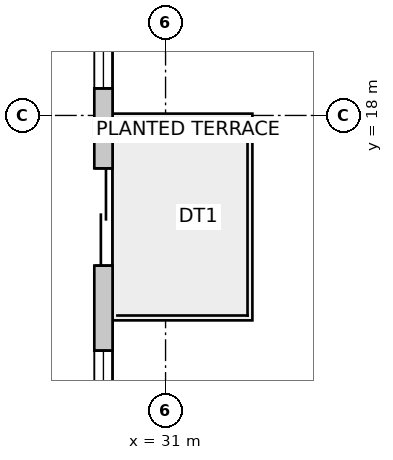
"""IFC4 building model, lengths in metres.
Left out: names, types, materials, properties, quantities, classifications, styles, units other than length and angle.
Written with IfcOpenShell. Run it as: python <this file> out.ifc"""

import sys

from ifc_helpers import new_model, si_unit, direction, frame, frame_2d, origin, place, context, subcontext, project, spatial, rectangle, extrude, source, transform, mapped, element, fill, save


model = new_model("IFC4")
c1 = context("Model", 3, precision=1e-05, world=origin(), true_north=direction((0.0, 1.0)))
c2 = subcontext(c1, "Body", "Model", "MODEL_VIEW")
j1 = project(units=[si_unit("LENGTHUNIT", "METRE"), si_unit("PLANEANGLEUNIT", "RADIAN")], contexts=[c1])
p1 = place(None, origin())
s1 = spatial("IfcSite", under=j1, at=p1, CompositionType="ELEMENT")
p2 = place(p1, origin())
s2 = spatial("IfcBuilding", under=s1, at=p2, CompositionType="ELEMENT")
p3 = place(p2, frame((0.0, 0.0, 51.0)))
s3 = spatial("IfcBuildingStorey", under=s2, at=p3, CompositionType="ELEMENT", Elevation=51.0)
p4 = place(p3, frame((29.978, 5.657, 0.0), z_axis=(0.0, 0.0, 1.0), x_axis=(0.0, 1.0, 0.0)))
e1 = element("IfcWall", 1, at=p4, inside=s3, PredefinedType="SOLIDWALL", context=c2, shape_type="SweptSolid", body=[
    extrude(rectangle(XDim=21.815, YDim=0.3, at=frame_2d((10.907, 0.0))), origin(), (0.0, 0.0, 1.0), 3.75),
])
m1 = source(origin(), c2, "Body", "SweptSolid", [
    extrude(rectangle(XDim=1.6, YDim=2.15, at=frame_2d((0.8, 1.075))), frame((0.0, 0.16, 0.0), z_axis=(0.0, -1.0, 0.0), x_axis=(1.0, 0.0, 0.0)), (0.0, 0.0, 1.0), 0.32),
])
p5 = place(p4, frame((9.873, 0.0, 0.0)))
e2 = element("IfcOpeningElement", 2, at=p5, cuts=e1, PredefinedType="OPENING", context=c2, shape_type="MappedRepresentation", body=[
    mapped(m1, transform((0.0, 0.0, 0.0), scale=1.0)),
])
m2 = source(origin(), c2, "Body", "SweptSolid", [
    extrude(rectangle(XDim=2.8, YDim=2.4, at=frame_2d((1.4, 1.2))), frame((0.0, 0.16, 0.0), z_axis=(0.0, -1.0, 0.0), x_axis=(1.0, 0.0, 0.0)), (0.0, 0.0, 1.0), 0.32),
])
p6 = place(p4, frame((1.238, 0.0, 0.85)))
e3 = element("IfcOpeningElement", 3, at=p6, cuts=e1, PredefinedType="OPENING", context=c2, shape_type="MappedRepresentation", body=[
    mapped(m2, transform((0.0, 0.0, 0.0), scale=1.0)),
])
m3 = source(origin(), c2, "Body", "SweptSolid", [
    extrude(rectangle(XDim=2.4, YDim=2.2, at=frame_2d((1.2, 1.1))), frame((0.0, 0.16, 0.0), z_axis=(0.0, -1.0, 0.0), x_axis=(1.0, 0.0, 0.0)), (0.0, 0.0, 1.0), 0.32),
])
p7 = place(p4, frame((6.075, 0.0, 0.85)))
e4 = element("IfcOpeningElement", 4, at=p7, cuts=e1, PredefinedType="OPENING", context=c2, shape_type="MappedRepresentation", body=[
    mapped(m3, transform((0.0, 0.0, 0.0), scale=1.0)),
])
p8 = place(p4, frame((12.788, 0.0, 0.85)))
e5 = element("IfcOpeningElement", 5, at=p8, cuts=e1, PredefinedType="OPENING", context=c2, shape_type="MappedRepresentation", body=[
    mapped(m2, transform((0.0, 0.0, 0.0), scale=1.0)),
])
p9 = place(p4, frame((17.859, 0.0, 0.85)))
e6 = element("IfcOpeningElement", 6, at=p9, cuts=e1, PredefinedType="OPENING", context=c2, shape_type="MappedRepresentation", body=[
    mapped(m3, transform((0.0, 0.0, 0.0), scale=1.0)),
])
m4 = source(origin(), c2, "Body", "SweptSolid", [
    extrude(rectangle(XDim=1.6, YDim=2.15, at=frame_2d((0.8, 1.075))), frame((0.0, 0.025, 0.0), z_axis=(0.0, -1.0, 0.0), x_axis=(1.0, 0.0, 0.0)), (0.0, 0.0, 1.0), 0.05),
])
p10 = place(p5, origin())
e7 = element("IfcDoor", 7, at=p10, inside=s3, OperationType="DOUBLE_DOOR_SLIDING", PredefinedType="DOOR", context=c2, shape_type="MappedRepresentation", body=[
    mapped(m4, transform((0.0, 0.0, 0.0), scale=1.0)),
])
fill(e2, e7)
m5 = source(origin(), c2, "Body", "SweptSolid", [
    extrude(rectangle(XDim=2.4, YDim=2.2, at=frame_2d((1.2, 1.1))), frame((0.0, -0.015, 0.0), z_axis=(0.0, -1.0, 0.0), x_axis=(1.0, 0.0, 0.0)), (0.0, 0.0, 1.0), 0.06),
])
p11 = place(p7, origin())
e8 = element("IfcWindow", 8, at=p11, inside=s3, PartitioningType="SINGLE_PANEL", PredefinedType="WINDOW", context=c2, shape_type="MappedRepresentation", body=[
    mapped(m5, transform((0.0, 0.0, 0.0), scale=1.0)),
])
fill(e4, e8)
m6 = source(origin(), c2, "Body", "SweptSolid", [
    extrude(rectangle(XDim=2.8, YDim=2.4, at=frame_2d((1.4, 1.2))), frame((0.0, -0.015, 0.0), z_axis=(0.0, -1.0, 0.0), x_axis=(1.0, 0.0, 0.0)), (0.0, 0.0, 1.0), 0.06),
])
p12 = place(p8, origin())
e9 = element("IfcWindow", 9, at=p12, inside=s3, PartitioningType="SINGLE_PANEL", PredefinedType="WINDOW", context=c2, shape_type="MappedRepresentation", body=[
    mapped(m6, transform((0.0, 0.0, 0.0), scale=1.0)),
])
fill(e5, e9)
save(model, sys.argv[1])
